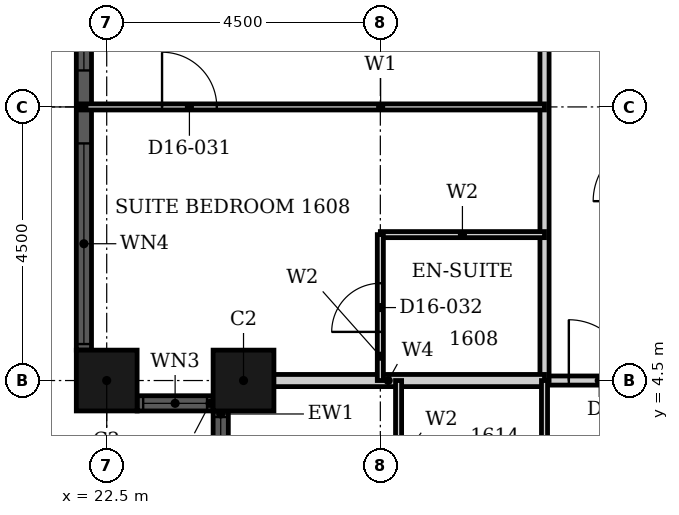
"""IFC4 building model, lengths in metres.
Left out: names, types, materials, properties, quantities, classifications, styles, units other than length and angle.
Written with IfcOpenShell. Run it as: python <this file> out.ifc"""

import sys

from ifc_helpers import new_model, si_unit, direction, frame, frame_2d, origin, origin_2d, place, context, subcontext, project, spatial, rectangle, hollow_rectangle, extrude, element, fill, save


model = new_model("IFC4")
c1 = context("Model", 3, precision=1e-05, world=origin(), true_north=direction((0.0, 1.0)))
c2 = subcontext(c1, "Body", "Model", "MODEL_VIEW")
j1 = project(units=[si_unit("LENGTHUNIT", "METRE"), si_unit("PLANEANGLEUNIT", "RADIAN")], contexts=[c1])
p1 = place(None, origin())
s1 = spatial("IfcSite", under=j1, at=p1, CompositionType="ELEMENT")
p2 = place(p1, origin())
s2 = spatial("IfcBuilding", under=s1, at=p2, CompositionType="ELEMENT")
p3 = place(p2, frame((0.0, 0.0, 70.8)))
s3 = spatial("IfcBuildingStorey", under=s2, at=p3, CompositionType="ELEMENT", Elevation=70.8)
for number, where, z_axis, x_axis in (
    (1, (22.5, 4.5, 0.0), (0.0, 0.0, 1.0), (1.0, 0.0, 0.0)),
    (2, (24.75, 4.5, 0.0), (0.0, 0.0, 1.0), (1.0, 0.0, 0.0)),
):
    element("IfcColumn", number, at=place(p3, frame(where, z_axis=z_axis, x_axis=x_axis)), inside=s3, PredefinedType="COLUMN", context=c2, shape_type="SweptSolid", body=[
        extrude(hollow_rectangle(XDim=1.0, YDim=1.0, WallThickness=0.032, at=origin_2d()), origin(), (0.0, 0.0, 1.0), 3.6),
    ])
p4 = place(p3, frame((23.0, 4.125, 0.0), z_axis=(0.0, 0.0, 1.0), x_axis=(1.0, 0.0, 0.0)))
e3 = element("IfcWall", 3, at=p4, inside=s3, PredefinedType="SOLIDWALL", context=c2, shape_type="SweptSolid", body=[
    extrude(rectangle(XDim=1.25, YDim=0.25, at=frame_2d((0.625, 0.0))), origin(), (0.0, 0.0, 1.0), 3.6),
])
p5 = place(p4, frame((0.1, 0.0, 0.9)))
e4 = element("IfcOpeningElement", 4, at=p5, cuts=e3, PredefinedType="OPENING", context=c2, shape_type="SweptSolid", body=[
    extrude(rectangle(XDim=1.05, YDim=2.08, at=frame_2d((0.525, 1.04))), frame((0.0, 0.135, 0.0), z_axis=(0.0, -1.0, 0.0), x_axis=(1.0, 0.0, 0.0)), (0.0, 0.0, 1.0), 0.27),
])
p6 = place(p3, frame((24.375, 4.0, 0.0), z_axis=(0.0, 0.0, 1.0), x_axis=(0.0, -1.0, 0.0)))
e5 = element("IfcWall", 5, at=p6, inside=s3, PredefinedType="SOLIDWALL", context=c2, shape_type="SweptSolid", body=[
    extrude(rectangle(XDim=1.25, YDim=0.25, at=frame_2d((0.625, 0.0))), origin(), (0.0, 0.0, 1.0), 3.6),
])
p7 = place(p6, frame((0.1, 0.0, 0.9)))
e6 = element("IfcOpeningElement", 6, at=p7, cuts=e5, PredefinedType="OPENING", context=c2, shape_type="SweptSolid", body=[
    extrude(rectangle(XDim=1.05, YDim=2.08, at=frame_2d((0.525, 1.04))), frame((0.0, 0.135, 0.0), z_axis=(0.0, -1.0, 0.0), x_axis=(1.0, 0.0, 0.0)), (0.0, 0.0, 1.0), 0.27),
])
p8 = place(p3, frame((22.125, 13.0, 0.0), z_axis=(0.0, 0.0, 1.0), x_axis=(0.0, -1.0, 0.0)))
e7 = element("IfcWall", 7, at=p8, inside=s3, PredefinedType="SOLIDWALL", context=c2, shape_type="SweptSolid", body=[
    extrude(rectangle(XDim=8.0, YDim=0.25, at=frame_2d((4.0, 0.0))), origin(), (0.0, 0.0, 1.0), 3.6),
])
p9 = place(p8, frame((0.1, 0.0, 0.9)))
e8 = element("IfcOpeningElement", 8, at=p9, cuts=e7, PredefinedType="OPENING", context=c2, shape_type="SweptSolid", body=[
    extrude(rectangle(XDim=3.3, YDim=2.08, at=frame_2d((1.65, 1.04))), frame((0.0, 0.135, 0.0), z_axis=(0.0, -1.0, 0.0), x_axis=(1.0, 0.0, 0.0)), (0.0, 0.0, 1.0), 0.27),
])
p10 = place(p8, frame((4.6, 0.0, 0.9)))
e9 = element("IfcOpeningElement", 9, at=p10, cuts=e7, PredefinedType="OPENING", context=c2, shape_type="SweptSolid", body=[
    extrude(rectangle(XDim=3.3, YDim=2.08, at=frame_2d((1.65, 1.04))), frame((0.0, 0.135, 0.0), z_axis=(0.0, -1.0, 0.0), x_axis=(1.0, 0.0, 0.0)), (0.0, 0.0, 1.0), 0.27),
])
p11 = place(p3, frame((29.7, 4.5, 0.0), z_axis=(0.0, 0.0, 1.0), x_axis=(1.0, 0.0, 0.0)))
e10 = element("IfcWall", 10, at=p11, inside=s3, PredefinedType="PARTITIONING", context=c2, shape_type="SweptSolid", body=[
    extrude(rectangle(XDim=1.8, YDim=0.15, at=frame_2d((0.9, 0.0))), origin(), (0.0, 0.0, 1.0), 3.3),
])
p12 = place(p11, frame((0.4, 0.0, 0.0)))
e11 = element("IfcOpeningElement", 11, at=p12, cuts=e10, PredefinedType="OPENING", context=c2, shape_type="SweptSolid", body=[
    extrude(rectangle(XDim=1.0, YDim=2.1, at=frame_2d((0.5, 1.05))), frame((0.0, 0.085, 0.0), z_axis=(0.0, -1.0, 0.0), x_axis=(1.0, 0.0, 0.0)), (0.0, 0.0, 1.0), 0.17),
])
p13 = place(p3, frame((29.7, 4.5, 0.0), z_axis=(0.0, 0.0, 1.0), x_axis=(0.0, 1.0, 0.0)))
e12 = element("IfcWall", 12, at=p13, inside=s3, PredefinedType="PARTITIONING", context=c2, shape_type="SweptSolid", body=[
    extrude(rectangle(XDim=16.2, YDim=0.15, at=frame_2d((8.1, 0.0))), origin(), (0.0, 0.0, 1.0), 3.3),
])
p14 = place(p13, frame((6.25, 0.0, 0.0)))
e13 = element("IfcOpeningElement", 13, at=p14, cuts=e12, PredefinedType="OPENING", context=c2, shape_type="SweptSolid", body=[
    extrude(rectangle(XDim=1.0, YDim=2.1, at=frame_2d((0.5, 1.05))), frame((0.0, 0.085, 0.0), z_axis=(0.0, -1.0, 0.0), x_axis=(1.0, 0.0, 0.0)), (0.0, 0.0, 1.0), 0.17),
])
p15 = place(p3, frame((22.06, 9.0, 0.0), z_axis=(0.0, 0.0, 1.0), x_axis=(1.0, 0.0, 0.0)))
e14 = element("IfcWall", 14, at=p15, inside=s3, PredefinedType="PARTITIONING", context=c2, shape_type="SweptSolid", body=[
    extrude(rectangle(XDim=7.64, YDim=0.1, at=frame_2d((3.82, 0.0))), origin(), (0.0, 0.0, 1.0), 3.3),
])
p16 = place(p15, frame((1.35, 0.0, 0.0)))
e15 = element("IfcOpeningElement", 15, at=p16, cuts=e14, PredefinedType="OPENING", context=c2, shape_type="SweptSolid", body=[
    extrude(rectangle(XDim=0.9, YDim=2.1, at=frame_2d((0.45, 1.05))), frame((0.0, 0.06, 0.0), z_axis=(0.0, -1.0, 0.0), x_axis=(1.0, 0.0, 0.0)), (0.0, 0.0, 1.0), 0.12),
])
p17 = place(p3, frame((24.56, 4.5, 0.0), z_axis=(0.0, 0.0, 1.0), x_axis=(1.0, 0.0, 0.0)))
e16 = element("IfcWall", 16, at=p17, inside=s3, PredefinedType="PARTITIONING", context=c2, shape_type="SweptSolid", body=[
    extrude(rectangle(XDim=5.14, YDim=0.2, at=frame_2d((2.57, 0.0))), origin(), (0.0, 0.0, 1.0), 3.3),
])
p18 = place(p3, frame((27.0, 6.9, 0.0), z_axis=(0.0, 0.0, 1.0), x_axis=(1.0, 0.0, 0.0)))
e17 = element("IfcWall", 17, at=p18, inside=s3, PredefinedType="PARTITIONING", context=c2, shape_type="SweptSolid", body=[
    extrude(rectangle(XDim=2.7, YDim=0.1, at=frame_2d((1.35, 0.0))), origin(), (0.0, 0.0, 1.0), 3.3),
])
p19 = place(p3, frame((27.0, 4.5, 0.0), z_axis=(0.0, 0.0, 1.0), x_axis=(0.0, 1.0, 0.0)))
e18 = element("IfcWall", 18, at=p19, inside=s3, PredefinedType="PARTITIONING", context=c2, shape_type="SweptSolid", body=[
    extrude(rectangle(XDim=2.4, YDim=0.1, at=frame_2d((1.2, 0.0))), origin(), (0.0, 0.0, 1.0), 2.58),
])
p20 = place(p19, frame((0.8, 0.0, 0.0)))
e19 = element("IfcOpeningElement", 19, at=p20, cuts=e18, PredefinedType="OPENING", context=c2, shape_type="SweptSolid", body=[
    extrude(rectangle(XDim=0.8, YDim=2.1, at=frame_2d((0.4, 1.05))), frame((0.0, 0.06, 0.0), z_axis=(0.0, -1.0, 0.0), x_axis=(1.0, 0.0, 0.0)), (0.0, 0.0, 1.0), 0.12),
])
for number, where, z_axis, x_axis in (
    (20, (27.3, 1.8, 0.0), (0.0, 0.0, 1.0), (0.0, 1.0, 0.0)),
    (21, (29.7, 1.8, 0.0), (0.0, 0.0, 1.0), (0.0, 1.0, 0.0)),
):
    element("IfcWall", number, at=place(p3, frame(where, z_axis=z_axis, x_axis=x_axis)), inside=s3, PredefinedType="PARTITIONING", context=c2, shape_type="SweptSolid", body=[
        extrude(rectangle(XDim=2.7, YDim=0.1, at=frame_2d((1.35, 0.0))), origin(), (0.0, 0.0, 1.0), 3.3),
    ])
p21 = place(p5, origin())
e22 = element("IfcWindow", 22, at=p21, inside=s3, PartitioningType="SINGLE_PANEL", PredefinedType="WINDOW", context=c2, shape_type="SweptSolid", body=[
    extrude(rectangle(XDim=1.05, YDim=2.08, at=frame_2d((0.525, 1.04))), frame((0.0, 0.03, 0.0), z_axis=(0.0, -1.0, 0.0), x_axis=(1.0, 0.0, 0.0)), (0.0, 0.0, 1.0), 0.06),
])
fill(e4, e22)
p22 = place(p7, origin())
e23 = element("IfcWindow", 23, at=p22, inside=s3, PartitioningType="SINGLE_PANEL", PredefinedType="WINDOW", context=c2, shape_type="SweptSolid", body=[
    extrude(rectangle(XDim=1.05, YDim=2.08, at=frame_2d((0.525, 1.04))), frame((0.0, 0.03, 0.0), z_axis=(0.0, -1.0, 0.0), x_axis=(1.0, 0.0, 0.0)), (0.0, 0.0, 1.0), 0.06),
])
fill(e6, e23)
p23 = place(p9, origin())
e24 = element("IfcWindow", 24, at=p23, inside=s3, PartitioningType="SINGLE_PANEL", PredefinedType="WINDOW", context=c2, shape_type="SweptSolid", body=[
    extrude(rectangle(XDim=3.3, YDim=2.08, at=frame_2d((1.65, 1.04))), frame((0.0, 0.03, 0.0), z_axis=(0.0, -1.0, 0.0), x_axis=(1.0, 0.0, 0.0)), (0.0, 0.0, 1.0), 0.06),
])
fill(e8, e24)
p24 = place(p10, origin())
e25 = element("IfcWindow", 25, at=p24, inside=s3, PartitioningType="SINGLE_PANEL", PredefinedType="WINDOW", context=c2, shape_type="SweptSolid", body=[
    extrude(rectangle(XDim=3.3, YDim=2.08, at=frame_2d((1.65, 1.04))), frame((0.0, 0.03, 0.0), z_axis=(0.0, -1.0, 0.0), x_axis=(1.0, 0.0, 0.0)), (0.0, 0.0, 1.0), 0.06),
])
fill(e9, e25)
p25 = place(p16, origin())
e26 = element("IfcDoor", 26, at=p25, inside=s3, OperationType="SINGLE_SWING_LEFT", PredefinedType="DOOR", context=c2, shape_type="SweptSolid", body=[
    extrude(rectangle(XDim=0.9, YDim=2.1, at=frame_2d((0.45, 1.05))), frame((0.0, 0.025, 0.0), z_axis=(0.0, -1.0, 0.0), x_axis=(1.0, 0.0, 0.0)), (0.0, 0.0, 1.0), 0.05),
])
fill(e15, e26)
p26 = place(p20, origin())
e27 = element("IfcDoor", 27, at=p26, inside=s3, OperationType="SINGLE_SWING_LEFT", PredefinedType="DOOR", context=c2, shape_type="SweptSolid", body=[
    extrude(rectangle(XDim=0.8, YDim=2.1, at=frame_2d((0.4, 1.05))), frame((0.0, 0.025, 0.0), z_axis=(0.0, -1.0, 0.0), x_axis=(1.0, 0.0, 0.0)), (0.0, 0.0, 1.0), 0.05),
])
fill(e19, e27)
p27 = place(p12, origin())
e28 = element("IfcDoor", 28, at=p27, inside=s3, OperationType="SINGLE_SWING_LEFT", PredefinedType="DOOR", context=c2, shape_type="SweptSolid", body=[
    extrude(rectangle(XDim=1.0, YDim=2.1, at=frame_2d((0.5, 1.05))), frame((0.0, 0.025, 0.0), z_axis=(0.0, -1.0, 0.0), x_axis=(1.0, 0.0, 0.0)), (0.0, 0.0, 1.0), 0.05),
])
fill(e11, e28)
save(model, sys.argv[1])
